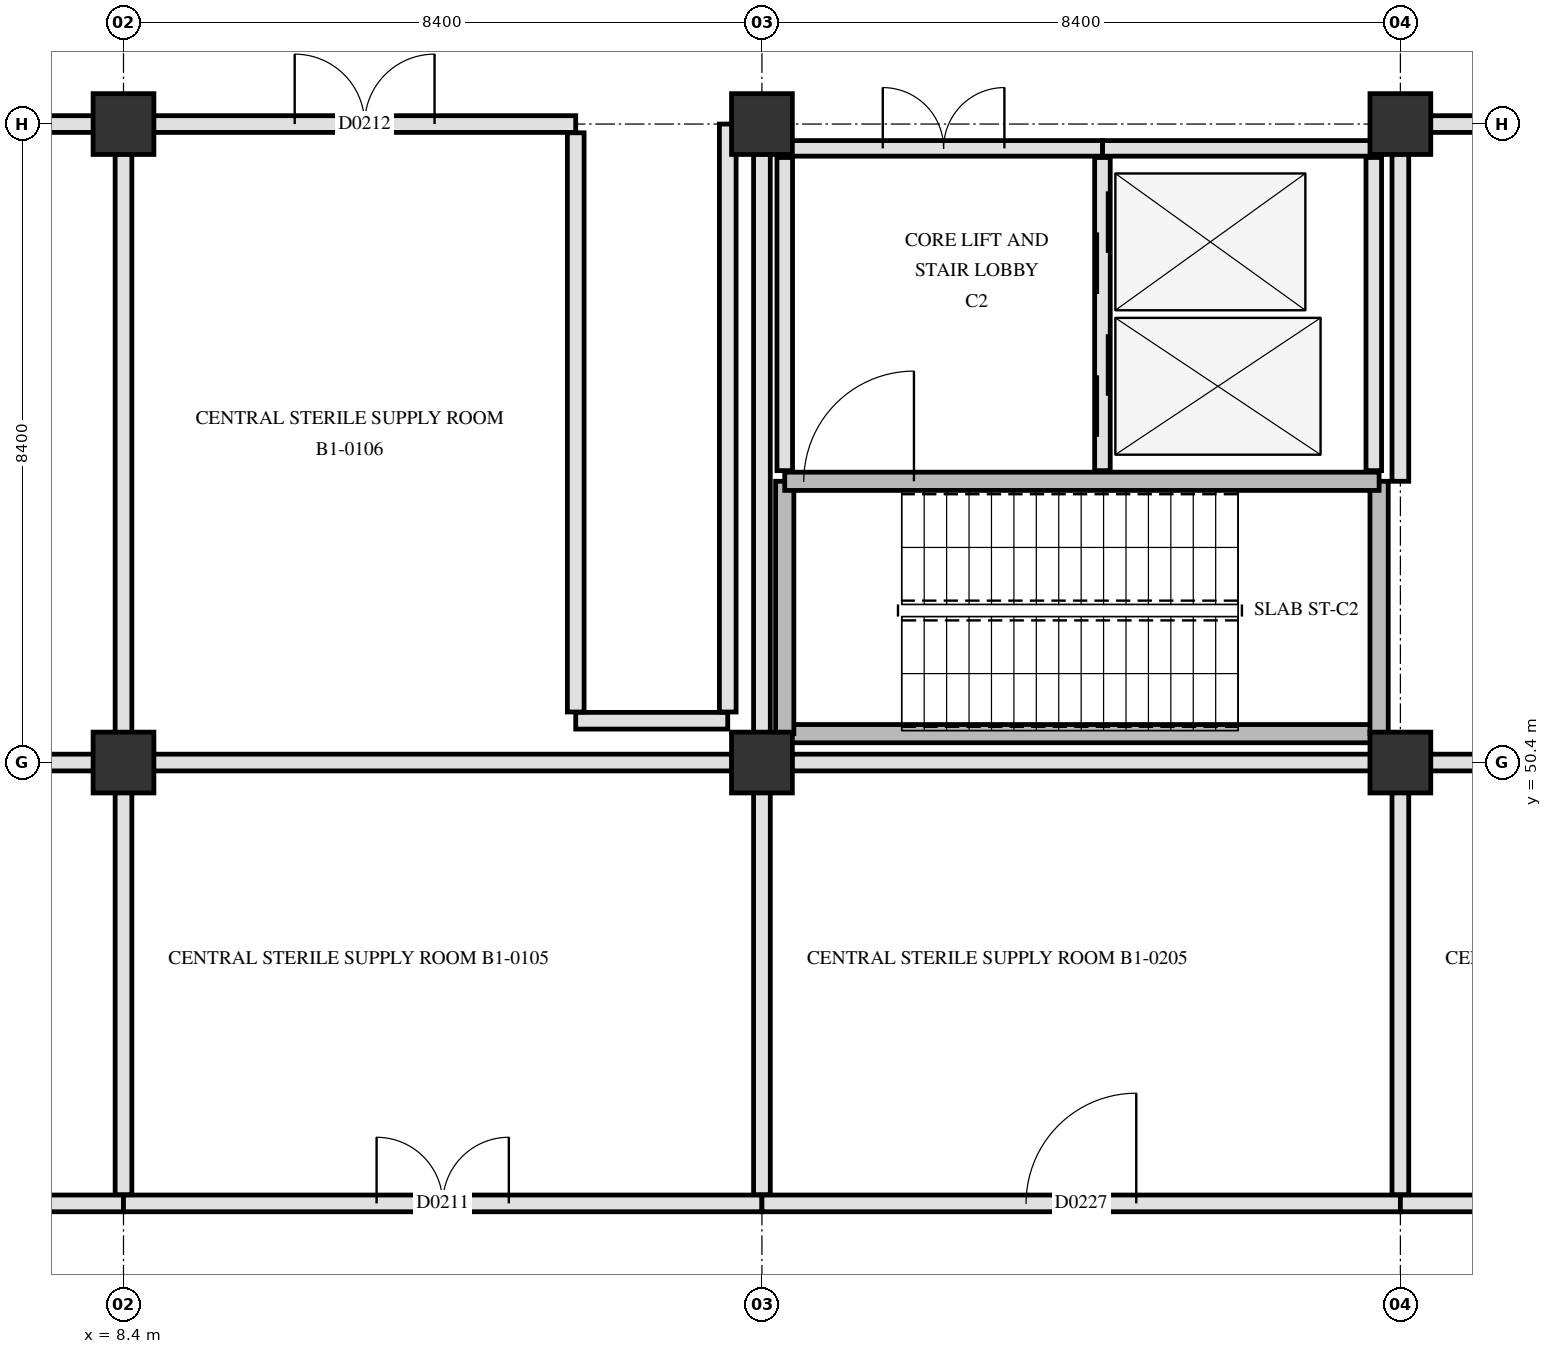
"""IFC4 building model, lengths in metres.
Left out: names, types, materials, properties, quantities, classifications, styles, units other than length and angle.
Written with IfcOpenShell. Run it as: python <this file> out.ifc"""

import sys

from ifc_helpers import new_model, si_unit, direction, frame, frame_2d, origin, origin_2d, place, context, subcontext, project, spatial, rectangle, extrude, element, fill, save


model = new_model("IFC4")
c1 = context("Model", 3, precision=1e-05, world=origin(), true_north=direction((0.0, 1.0)))
c2 = subcontext(c1, "Body", "Model", "MODEL_VIEW")
j1 = project(units=[si_unit("LENGTHUNIT", "METRE"), si_unit("PLANEANGLEUNIT", "RADIAN")], contexts=[c1])
p1 = place(None, origin())
s1 = spatial("IfcSite", under=j1, at=p1, CompositionType="ELEMENT")
p2 = place(p1, origin())
s2 = spatial("IfcBuilding", under=s1, at=p2, CompositionType="ELEMENT")
p3 = place(p2, frame((0.0, 0.0, -5.4)))
s3 = spatial("IfcBuildingStorey", under=s2, at=p3, CompositionType="ELEMENT", Elevation=-5.4)
for number, where, z_axis, x_axis in (
    (1, (8.4, 50.4, 0.0), (0.0, 0.0, 1.0), (1.0, 0.0, 0.0)),
    (2, (8.4, 58.8, 0.0), (0.0, 0.0, 1.0), (1.0, 0.0, 0.0)),
    (3, (16.8, 50.4, 0.0), (0.0, 0.0, 1.0), (1.0, 0.0, 0.0)),
    (4, (16.8, 58.8, 0.0), (0.0, 0.0, 1.0), (1.0, 0.0, 0.0)),
    (5, (25.2, 50.4, 0.0), (0.0, 0.0, 1.0), (1.0, 0.0, 0.0)),
    (6, (25.2, 58.8, 0.0), (0.0, 0.0, 1.0), (1.0, 0.0, 0.0)),
):
    element("IfcColumn", number, at=place(p3, frame(where, z_axis=z_axis, x_axis=x_axis)), inside=s3, PredefinedType="COLUMN", context=c2, shape_type="SweptSolid", body=[
        extrude(rectangle(XDim=0.8, YDim=0.8, at=origin_2d()), origin(), (0.0, 0.0, 1.0), 5.4),
    ])
p4 = place(p3, frame((17.1, 50.78, 0.0), z_axis=(0.0, 0.0, 1.0), x_axis=(1.0, 0.0, 0.0)))
e7 = element("IfcWall", 7, at=p4, inside=s3, PredefinedType="SHEAR", context=c2, shape_type="SweptSolid", body=[
    extrude(rectangle(XDim=7.82, YDim=0.24, at=frame_2d((3.91, 0.0))), origin(), (0.0, 0.0, 1.0), 5.08),
])
for number, where, z_axis, x_axis in (
    (8, (17.1, 50.78, 0.0), (0.0, 0.0, 1.0), (0.0, 1.0, 0.0)),
    (9, (24.92, 50.78, 0.0), (0.0, 0.0, 1.0), (0.0, 1.0, 0.0)),
):
    element("IfcWall", number, at=place(p3, frame(where, z_axis=z_axis, x_axis=x_axis)), inside=s3, PredefinedType="SHEAR", context=c2, shape_type="SweptSolid", body=[
        extrude(rectangle(XDim=3.32, YDim=0.24, at=frame_2d((1.66, 0.0))), origin(), (0.0, 0.0, 1.0), 5.08),
    ])
p5 = place(p3, frame((17.1, 54.1, 0.0), z_axis=(0.0, 0.0, 1.0), x_axis=(1.0, 0.0, 0.0)))
e10 = element("IfcWall", 10, at=p5, inside=s3, PredefinedType="SHEAR", context=c2, shape_type="SweptSolid", body=[
    extrude(rectangle(XDim=7.82, YDim=0.24, at=frame_2d((3.91, 0.0))), origin(), (0.0, 0.0, 1.0), 5.08),
])
p6 = place(p5, frame((0.25, 0.0, 0.0)))
e11 = element("IfcOpeningElement", 11, at=p6, cuts=e10, PredefinedType="OPENING", context=c2, shape_type="SweptSolid", body=[
    extrude(rectangle(XDim=1.45, YDim=2.2, at=frame_2d((0.725, 1.1))), frame((0.0, 0.13, 0.0), z_axis=(0.0, -1.0, 0.0), x_axis=(1.0, 0.0, 0.0)), (0.0, 0.0, 1.0), 0.26),
])
p7 = place(p3, frame((21.28, 54.24, 0.0), z_axis=(0.0, 0.0, 1.0), x_axis=(0.0, 1.0, 0.0)))
e12 = element("IfcWall", 12, at=p7, inside=s3, PredefinedType="PARTITIONING", context=c2, shape_type="SweptSolid", body=[
    extrude(rectangle(XDim=4.12, YDim=0.205, at=frame_2d((2.06, 0.0))), origin(), (0.0, 0.0, 1.0), 5.07),
])
p8 = place(p7, frame((0.445, 0.0, 0.0)))
e13 = element("IfcOpeningElement", 13, at=p8, cuts=e12, PredefinedType="OPENING", context=c2, shape_type="SweptSolid", body=[
    extrude(rectangle(XDim=1.35, YDim=2.2, at=frame_2d((0.675, 1.1))), frame((0.0, 0.113, 0.0), z_axis=(0.0, -1.0, 0.0), x_axis=(1.0, 0.0, 0.0)), (0.0, 0.0, 1.0), 0.225),
])
p9 = place(p7, frame((2.325, 0.0, 0.0)))
e14 = element("IfcOpeningElement", 14, at=p9, cuts=e12, PredefinedType="OPENING", context=c2, shape_type="SweptSolid", body=[
    extrude(rectangle(XDim=1.35, YDim=2.2, at=frame_2d((0.675, 1.1))), frame((0.0, 0.113, 0.0), z_axis=(0.0, -1.0, 0.0), x_axis=(1.0, 0.0, 0.0)), (0.0, 0.0, 1.0), 0.225),
])
p10 = place(p3, frame((24.85, 54.24, 0.0), z_axis=(0.0, 0.0, 1.0), x_axis=(0.0, 1.0, 0.0)))
e15 = element("IfcWall", 15, at=p10, inside=s3, PredefinedType="PARTITIONING", context=c2, shape_type="SweptSolid", body=[
    extrude(rectangle(XDim=4.12, YDim=0.205, at=frame_2d((2.06, 0.0))), origin(), (0.0, 0.0, 1.0), 5.07),
])
p11 = place(p3, frame((21.28, 58.48, 0.0), z_axis=(0.0, 0.0, 1.0), x_axis=(1.0, 0.0, 0.0)))
e16 = element("IfcWall", 16, at=p11, inside=s3, PredefinedType="PARTITIONING", context=c2, shape_type="SweptSolid", body=[
    extrude(rectangle(XDim=3.57, YDim=0.205, at=frame_2d((1.785, 0.0))), origin(), (0.0, 0.0, 1.0), 4.42),
])
p12 = place(p3, frame((17.1, 54.24, 0.0), z_axis=(0.0, 0.0, 1.0), x_axis=(0.0, 1.0, 0.0)))
e17 = element("IfcWall", 17, at=p12, inside=s3, PredefinedType="PARTITIONING", context=c2, shape_type="SweptSolid", body=[
    extrude(rectangle(XDim=4.12, YDim=0.205, at=frame_2d((2.06, 0.0))), origin(), (0.0, 0.0, 1.0), 4.47),
])
p13 = place(p3, frame((17.1, 58.48, 0.0), z_axis=(0.0, 0.0, 1.0), x_axis=(1.0, 0.0, 0.0)))
e18 = element("IfcWall", 18, at=p13, inside=s3, PredefinedType="PARTITIONING", context=c2, shape_type="SweptSolid", body=[
    extrude(rectangle(XDim=4.18, YDim=0.205, at=frame_2d((2.09, 0.0))), origin(), (0.0, 0.0, 1.0), 4.42),
])
p14 = place(p13, frame((1.29, 0.0, 0.0)))
e19 = element("IfcOpeningElement", 19, at=p14, cuts=e18, PredefinedType="OPENING", context=c2, shape_type="SweptSolid", body=[
    extrude(rectangle(XDim=1.6, YDim=2.25, at=frame_2d((0.8, 1.125))), frame((0.0, 0.113, 0.0), z_axis=(0.0, -1.0, 0.0), x_axis=(1.0, 0.0, 0.0)), (0.0, 0.0, 1.0), 0.225),
])
p15 = place(p3, frame((0.28, 44.6, 0.0), z_axis=(0.0, 0.0, 1.0), x_axis=(1.0, 0.0, 0.0)))
e20 = element("IfcWall", 20, at=p15, inside=s3, PredefinedType="PARTITIONING", context=c2, shape_type="SweptSolid", body=[
    extrude(rectangle(XDim=8.12, YDim=0.22, at=frame_2d((4.06, 0.0))), origin(), (0.0, 0.0, 1.0), 4.47),
])
p16 = place(p15, frame((3.335, 0.0, 0.0)))
e21 = element("IfcOpeningElement", 21, at=p16, cuts=e20, PredefinedType="OPENING", context=c2, shape_type="SweptSolid", body=[
    extrude(rectangle(XDim=1.45, YDim=2.2, at=frame_2d((0.725, 1.1))), frame((0.0, 0.12, 0.0), z_axis=(0.0, -1.0, 0.0), x_axis=(1.0, 0.0, 0.0)), (0.0, 0.0, 1.0), 0.24),
])
p17 = place(p3, frame((8.4, 44.6, 0.0), z_axis=(0.0, 0.0, 1.0), x_axis=(1.0, 0.0, 0.0)))
e22 = element("IfcWall", 22, at=p17, inside=s3, PredefinedType="PARTITIONING", context=c2, shape_type="SweptSolid", body=[
    extrude(rectangle(XDim=8.4, YDim=0.22, at=frame_2d((4.2, 0.0))), origin(), (0.0, 0.0, 1.0), 4.47),
])
p18 = place(p17, frame((3.33, 0.0, 0.0)))
e23 = element("IfcOpeningElement", 23, at=p18, cuts=e22, PredefinedType="OPENING", context=c2, shape_type="SweptSolid", body=[
    extrude(rectangle(XDim=1.74, YDim=2.24, at=frame_2d((0.87, 1.12))), frame((0.0, 0.12, 0.0), z_axis=(0.0, -1.0, 0.0), x_axis=(1.0, 0.0, 0.0)), (0.0, 0.0, 1.0), 0.24),
])
p19 = place(p3, frame((16.8, 44.6, 0.0), z_axis=(0.0, 0.0, 1.0), x_axis=(1.0, 0.0, 0.0)))
e24 = element("IfcWall", 24, at=p19, inside=s3, PredefinedType="PARTITIONING", context=c2, shape_type="SweptSolid", body=[
    extrude(rectangle(XDim=8.4, YDim=0.22, at=frame_2d((4.2, 0.0))), origin(), (0.0, 0.0, 1.0), 4.47),
])
p20 = place(p19, frame((3.475, 0.0, 0.0)))
e25 = element("IfcOpeningElement", 25, at=p20, cuts=e24, PredefinedType="OPENING", context=c2, shape_type="SweptSolid", body=[
    extrude(rectangle(XDim=1.45, YDim=2.2, at=frame_2d((0.725, 1.1))), frame((0.0, 0.12, 0.0), z_axis=(0.0, -1.0, 0.0), x_axis=(1.0, 0.0, 0.0)), (0.0, 0.0, 1.0), 0.24),
])
p21 = place(p3, frame((25.2, 44.6, 0.0), z_axis=(0.0, 0.0, 1.0), x_axis=(1.0, 0.0, 0.0)))
e26 = element("IfcWall", 26, at=p21, inside=s3, PredefinedType="PARTITIONING", context=c2, shape_type="SweptSolid", body=[
    extrude(rectangle(XDim=8.4, YDim=0.22, at=frame_2d((4.2, 0.0))), origin(), (0.0, 0.0, 1.0), 4.47),
])
p22 = place(p21, frame((3.43, 0.0, 0.0)))
e27 = element("IfcOpeningElement", 27, at=p22, cuts=e26, PredefinedType="OPENING", context=c2, shape_type="SweptSolid", body=[
    extrude(rectangle(XDim=1.54, YDim=2.24, at=frame_2d((0.77, 1.12))), frame((0.0, 0.12, 0.0), z_axis=(0.0, -1.0, 0.0), x_axis=(1.0, 0.0, 0.0)), (0.0, 0.0, 1.0), 0.24),
])
p23 = place(p3, frame((0.395, 50.4, 0.0), z_axis=(0.0, 0.0, 1.0), x_axis=(1.0, 0.0, 0.0)))
e28 = element("IfcWall", 28, at=p23, inside=s3, PredefinedType="PARTITIONING", context=c2, shape_type="SweptSolid", body=[
    extrude(rectangle(XDim=7.61, YDim=0.22, at=frame_2d((3.805, 0.0))), origin(), (0.0, 0.0, 1.0), 4.42),
])
p24 = place(p3, frame((8.795, 50.4, 0.0), z_axis=(0.0, 0.0, 1.0), x_axis=(1.0, 0.0, 0.0)))
e29 = element("IfcWall", 29, at=p24, inside=s3, PredefinedType="PARTITIONING", context=c2, shape_type="SweptSolid", body=[
    extrude(rectangle(XDim=7.61, YDim=0.22, at=frame_2d((3.805, 0.0))), origin(), (0.0, 0.0, 1.0), 4.42),
])
p25 = place(p3, frame((17.195, 50.4, 0.0), z_axis=(0.0, 0.0, 1.0), x_axis=(1.0, 0.0, 0.0)))
e30 = element("IfcWall", 30, at=p25, inside=s3, PredefinedType="PARTITIONING", context=c2, shape_type="SweptSolid", body=[
    extrude(rectangle(XDim=7.61, YDim=0.22, at=frame_2d((3.805, 0.0))), origin(), (0.0, 0.0, 1.0), 4.42),
])
p26 = place(p3, frame((25.595, 50.4, 0.0), z_axis=(0.0, 0.0, 1.0), x_axis=(1.0, 0.0, 0.0)))
e31 = element("IfcWall", 31, at=p26, inside=s3, PredefinedType="PARTITIONING", context=c2, shape_type="SweptSolid", body=[
    extrude(rectangle(XDim=7.61, YDim=0.22, at=frame_2d((3.805, 0.0))), origin(), (0.0, 0.0, 1.0), 4.42),
])
p27 = place(p3, frame((14.35, 50.95, 0.0), z_axis=(0.0, 0.0, 1.0), x_axis=(1.0, 0.0, 0.0)))
e32 = element("IfcWall", 32, at=p27, inside=s3, PredefinedType="PARTITIONING", context=c2, shape_type="SweptSolid", body=[
    extrude(rectangle(XDim=2.0, YDim=0.22, at=frame_2d((1.0, 0.0))), origin(), (0.0, 0.0, 1.0), 5.07),
])
p28 = place(p3, frame((0.395, 58.8, 0.0), z_axis=(0.0, 0.0, 1.0), x_axis=(1.0, 0.0, 0.0)))
e33 = element("IfcWall", 33, at=p28, inside=s3, PredefinedType="PARTITIONING", context=c2, shape_type="SweptSolid", body=[
    extrude(rectangle(XDim=7.61, YDim=0.22, at=frame_2d((3.805, 0.0))), origin(), (0.0, 0.0, 1.0), 4.42),
])
p29 = place(p28, frame((3.005, 0.0, 0.0)))
e34 = element("IfcOpeningElement", 34, at=p29, cuts=e33, PredefinedType="OPENING", context=c2, shape_type="SweptSolid", body=[
    extrude(rectangle(XDim=1.6, YDim=2.25, at=frame_2d((0.8, 1.125))), frame((0.0, 0.12, 0.0), z_axis=(0.0, -1.0, 0.0), x_axis=(1.0, 0.0, 0.0)), (0.0, 0.0, 1.0), 0.24),
])
p30 = place(p3, frame((8.795, 58.8, 0.0), z_axis=(0.0, 0.0, 1.0), x_axis=(1.0, 0.0, 0.0)))
e35 = element("IfcWall", 35, at=p30, inside=s3, PredefinedType="PARTITIONING", context=c2, shape_type="SweptSolid", body=[
    extrude(rectangle(XDim=5.555, YDim=0.22, at=frame_2d((2.778, 0.0))), origin(), (0.0, 0.0, 1.0), 4.42),
])
p31 = place(p30, frame((1.857, 0.0, 0.0)))
e36 = element("IfcOpeningElement", 36, at=p31, cuts=e35, PredefinedType="OPENING", context=c2, shape_type="SweptSolid", body=[
    extrude(rectangle(XDim=1.84, YDim=2.28, at=frame_2d((0.92, 1.14))), frame((0.0, 0.12, 0.0), z_axis=(0.0, -1.0, 0.0), x_axis=(1.0, 0.0, 0.0)), (0.0, 0.0, 1.0), 0.24),
])
p32 = place(p3, frame((25.595, 58.8, 0.0), z_axis=(0.0, 0.0, 1.0), x_axis=(1.0, 0.0, 0.0)))
e37 = element("IfcWall", 37, at=p32, inside=s3, PredefinedType="PARTITIONING", context=c2, shape_type="SweptSolid", body=[
    extrude(rectangle(XDim=7.61, YDim=0.22, at=frame_2d((3.805, 0.0))), origin(), (0.0, 0.0, 1.0), 4.42),
])
p33 = place(p32, frame((2.985, 0.0, 0.0)))
e38 = element("IfcOpeningElement", 38, at=p33, cuts=e37, PredefinedType="OPENING", context=c2, shape_type="SweptSolid", body=[
    extrude(rectangle(XDim=1.64, YDim=2.28, at=frame_2d((0.82, 1.14))), frame((0.0, 0.12, 0.0), z_axis=(0.0, -1.0, 0.0), x_axis=(1.0, 0.0, 0.0)), (0.0, 0.0, 1.0), 0.24),
])
p34 = place(p3, frame((8.4, 44.715, 0.0), z_axis=(0.0, 0.0, 1.0), x_axis=(0.0, 1.0, 0.0)))
e39 = element("IfcWall", 39, at=p34, inside=s3, PredefinedType="PARTITIONING", context=c2, shape_type="SweptSolid", body=[
    extrude(rectangle(XDim=5.29, YDim=0.22, at=frame_2d((2.645, 0.0))), origin(), (0.0, 0.0, 1.0), 4.47),
])
p35 = place(p3, frame((8.4, 50.795, 0.0), z_axis=(0.0, 0.0, 1.0), x_axis=(0.0, 1.0, 0.0)))
e40 = element("IfcWall", 40, at=p35, inside=s3, PredefinedType="PARTITIONING", context=c2, shape_type="SweptSolid", body=[
    extrude(rectangle(XDim=7.61, YDim=0.22, at=frame_2d((3.805, 0.0))), origin(), (0.0, 0.0, 1.0), 4.47),
])
p36 = place(p3, frame((14.35, 51.065, 0.0), z_axis=(0.0, 0.0, 1.0), x_axis=(0.0, 1.0, 0.0)))
e41 = element("IfcWall", 41, at=p36, inside=s3, PredefinedType="PARTITIONING", context=c2, shape_type="SweptSolid", body=[
    extrude(rectangle(XDim=7.62, YDim=0.22, at=frame_2d((3.81, 0.0))), origin(), (0.0, 0.0, 1.0), 4.42),
])
p37 = place(p3, frame((16.35, 51.065, 0.0), z_axis=(0.0, 0.0, 1.0), x_axis=(0.0, 1.0, 0.0)))
e42 = element("IfcWall", 42, at=p37, inside=s3, PredefinedType="PARTITIONING", context=c2, shape_type="SweptSolid", body=[
    extrude(rectangle(XDim=7.735, YDim=0.22, at=frame_2d((3.868, 0.0))), origin(), (0.0, 0.0, 1.0), 4.42),
])
p38 = place(p3, frame((16.8, 44.715, 0.0), z_axis=(0.0, 0.0, 1.0), x_axis=(0.0, 1.0, 0.0)))
e43 = element("IfcWall", 43, at=p38, inside=s3, PredefinedType="PARTITIONING", context=c2, shape_type="SweptSolid", body=[
    extrude(rectangle(XDim=5.29, YDim=0.22, at=frame_2d((2.645, 0.0))), origin(), (0.0, 0.0, 1.0), 4.47),
])
p39 = place(p3, frame((16.8, 50.795, 0.0), z_axis=(0.0, 0.0, 1.0), x_axis=(0.0, 1.0, 0.0)))
e44 = element("IfcWall", 44, at=p39, inside=s3, PredefinedType="PARTITIONING", context=c2, shape_type="SweptSolid", body=[
    extrude(rectangle(XDim=7.61, YDim=0.22, at=frame_2d((3.805, 0.0))), origin(), (0.0, 0.0, 1.0), 4.47),
])
p40 = place(p3, frame((25.2, 44.715, 0.0), z_axis=(0.0, 0.0, 1.0), x_axis=(0.0, 1.0, 0.0)))
e45 = element("IfcWall", 45, at=p40, inside=s3, PredefinedType="PARTITIONING", context=c2, shape_type="SweptSolid", body=[
    extrude(rectangle(XDim=5.29, YDim=0.22, at=frame_2d((2.645, 0.0))), origin(), (0.0, 0.0, 1.0), 4.47),
])
p41 = place(p3, frame((25.2, 54.1, 0.0), z_axis=(0.0, 0.0, 1.0), x_axis=(0.0, 1.0, 0.0)))
e46 = element("IfcWall", 46, at=p41, inside=s3, PredefinedType="PARTITIONING", context=c2, shape_type="SweptSolid", body=[
    extrude(rectangle(XDim=4.305, YDim=0.22, at=frame_2d((2.152, 0.0))), origin(), (0.0, 0.0, 1.0), 4.47),
])
p42 = place(p6, origin())
e47 = element("IfcDoor", 47, at=p42, inside=s3, OperationType="SINGLE_SWING_RIGHT", PredefinedType="DOOR", context=c2, shape_type="SweptSolid", body=[
    extrude(rectangle(XDim=1.45, YDim=2.2, at=frame_2d((0.725, 1.1))), frame((0.0, 0.025, 0.0), z_axis=(0.0, -1.0, 0.0), x_axis=(1.0, 0.0, 0.0)), (0.0, 0.0, 1.0), 0.05),
])
fill(e11, e47)
p43 = place(p8, origin())
e48 = element("IfcDoor", 48, at=p43, inside=s3, OperationType="SLIDING_TO_LEFT", PredefinedType="DOOR", context=c2, shape_type="SweptSolid", body=[
    extrude(rectangle(XDim=1.35, YDim=2.2, at=frame_2d((0.675, 1.1))), frame((0.0, 0.025, 0.0), z_axis=(0.0, -1.0, 0.0), x_axis=(1.0, 0.0, 0.0)), (0.0, 0.0, 1.0), 0.05),
])
fill(e13, e48)
p44 = place(p9, origin())
e49 = element("IfcDoor", 49, at=p44, inside=s3, OperationType="SLIDING_TO_LEFT", PredefinedType="DOOR", context=c2, shape_type="SweptSolid", body=[
    extrude(rectangle(XDim=1.35, YDim=2.2, at=frame_2d((0.675, 1.1))), frame((0.0, 0.025, 0.0), z_axis=(0.0, -1.0, 0.0), x_axis=(1.0, 0.0, 0.0)), (0.0, 0.0, 1.0), 0.05),
])
fill(e14, e49)
p45 = place(p14, origin())
e50 = element("IfcDoor", 50, at=p45, inside=s3, OperationType="DOUBLE_SWING_LEFT", PredefinedType="DOOR", context=c2, shape_type="SweptSolid", body=[
    extrude(rectangle(XDim=1.6, YDim=2.25, at=frame_2d((0.8, 1.125))), frame((0.0, 0.025, 0.0), z_axis=(0.0, -1.0, 0.0), x_axis=(1.0, 0.0, 0.0)), (0.0, 0.0, 1.0), 0.05),
])
fill(e19, e50)
p46 = place(p18, origin())
e51 = element("IfcDoor", 51, at=p46, inside=s3, OperationType="DOUBLE_SWING_RIGHT", PredefinedType="DOOR", context=c2, shape_type="SweptSolid", body=[
    extrude(rectangle(XDim=1.74, YDim=2.24, at=frame_2d((0.87, 1.12))), frame((0.0, 0.025, 0.0), z_axis=(0.0, -1.0, 0.0), x_axis=(1.0, 0.0, 0.0)), (0.0, 0.0, 1.0), 0.05),
])
fill(e23, e51)
p47 = place(p31, origin())
e52 = element("IfcDoor", 52, at=p47, inside=s3, OperationType="DOUBLE_SWING_LEFT", PredefinedType="DOOR", context=c2, shape_type="SweptSolid", body=[
    extrude(rectangle(XDim=1.84, YDim=2.28, at=frame_2d((0.92, 1.14))), frame((0.0, 0.025, 0.0), z_axis=(0.0, -1.0, 0.0), x_axis=(1.0, 0.0, 0.0)), (0.0, 0.0, 1.0), 0.05),
])
fill(e36, e52)
p48 = place(p20, origin())
e53 = element("IfcDoor", 53, at=p48, inside=s3, OperationType="SINGLE_SWING_RIGHT", PredefinedType="DOOR", context=c2, shape_type="SweptSolid", body=[
    extrude(rectangle(XDim=1.45, YDim=2.2, at=frame_2d((0.725, 1.1))), frame((0.0, 0.025, 0.0), z_axis=(0.0, -1.0, 0.0), x_axis=(1.0, 0.0, 0.0)), (0.0, 0.0, 1.0), 0.05),
])
fill(e25, e53)
save(model, sys.argv[1])
